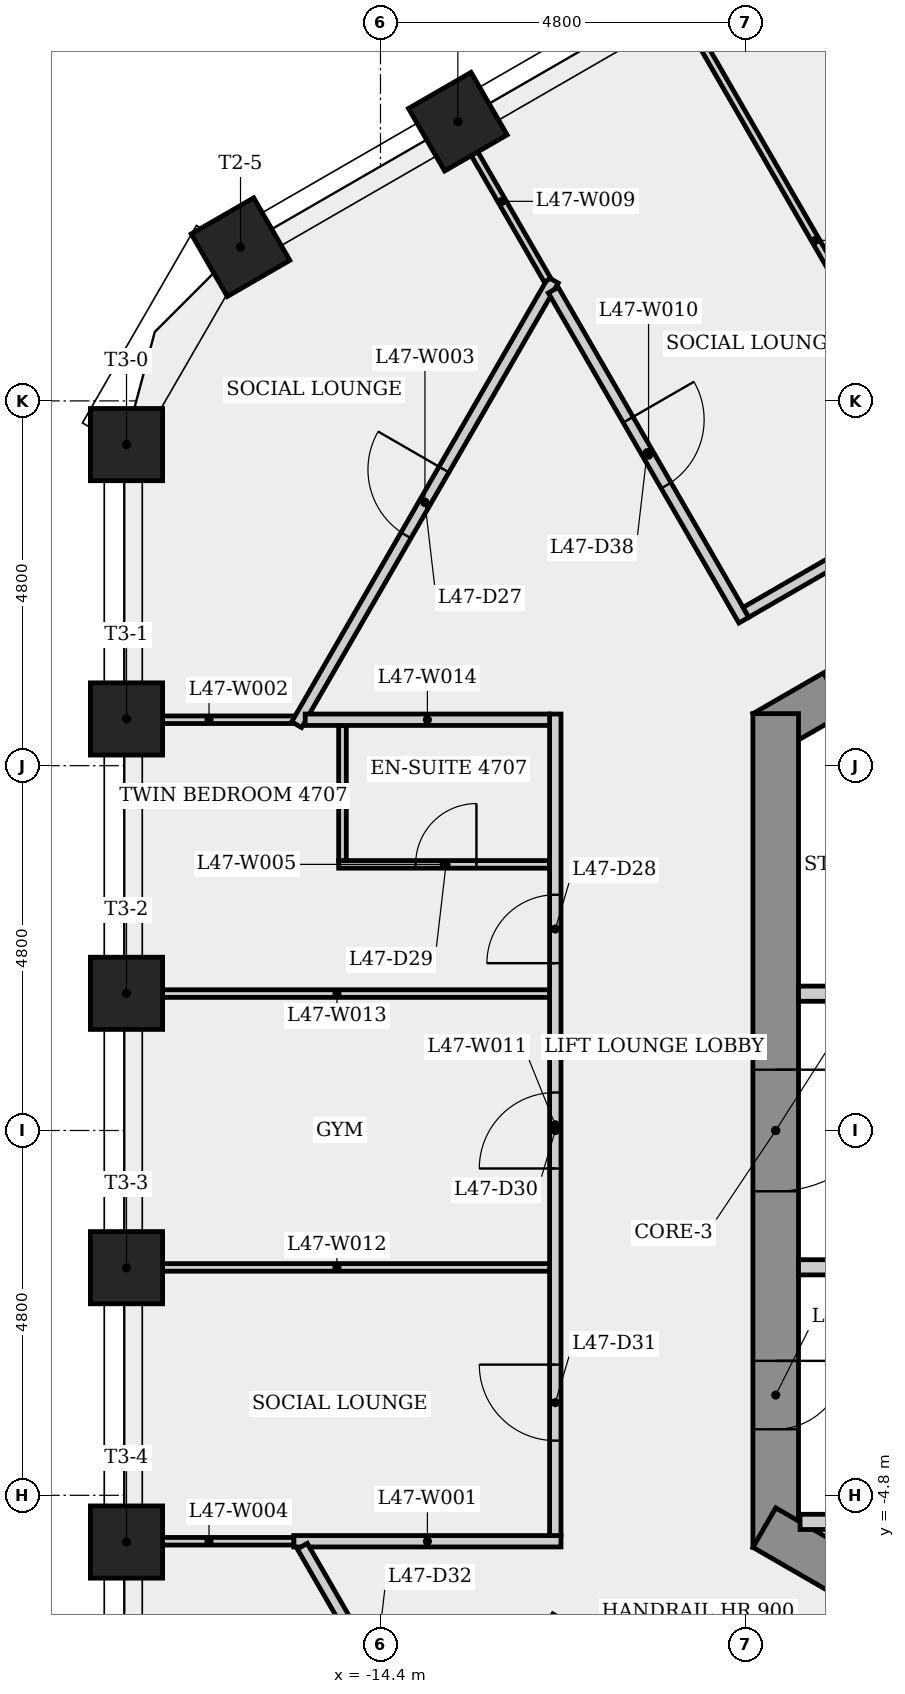
"""IFC4 building model, lengths in metres.
Left out: names, types, materials, properties, quantities, classifications, styles, units other than length and angle.
Written with IfcOpenShell. Run it as: python <this file> out.ifc"""

import sys

from ifc_helpers import new_model, si_unit, direction, frame, frame_2d, origin, origin_2d, place, context, subcontext, project, spatial, rectangle, extrude, element, fill, save


model = new_model("IFC4")
c1 = context("Model", 3, precision=1e-05, world=origin(), true_north=direction((0.0, 1.0)))
c2 = subcontext(c1, "Body", "Model", "MODEL_VIEW")
j1 = project(units=[si_unit("LENGTHUNIT", "METRE"), si_unit("PLANEANGLEUNIT", "RADIAN")], contexts=[c1])
p1 = place(None, origin())
s1 = spatial("IfcSite", under=j1, at=p1, CompositionType="ELEMENT")
p2 = place(p1, origin())
s2 = spatial("IfcBuilding", under=s1, at=p2, CompositionType="ELEMENT")
p3 = place(p2, frame((0.0, 0.0, 176.5)))
s3 = spatial("IfcBuildingStorey", under=s2, at=p3, CompositionType="ELEMENT", Elevation=176.5)
p4 = place(p3, frame((0.15, 10.71, 0.0), z_axis=(0.0, 0.0, 1.0), x_axis=(-0.866023993627, -0.500002442456, 0.0)))
e1 = element("IfcWall", 1, at=p4, inside=s3, PredefinedType="SHEAR", context=c2, shape_type="SweptSolid", body=[
    extrude(rectangle(XDim=10.97, YDim=0.6, at=frame_2d((5.485, 0.0))), origin(), (0.0, 0.0, 1.0), 3.4),
])
p5 = place(p4, frame((9.013, 0.0, 0.0)))
e2 = element("IfcOpeningElement", 2, at=p5, cuts=e1, PredefinedType="OPENING", context=c2, shape_type="SweptSolid", body=[
    extrude(rectangle(XDim=0.9, YDim=2.1, at=frame_2d((0.45, 1.05))), frame((0.0, 0.31, 0.0), z_axis=(0.0, -1.0, 0.0), x_axis=(1.0, 0.0, 0.0)), (0.0, 0.0, 1.0), 0.62),
])
p6 = place(p4, frame((2.437, 0.0, 0.0)))
e3 = element("IfcOpeningElement", 3, at=p6, cuts=e1, PredefinedType="OPENING", context=c2, shape_type="SweptSolid", body=[
    extrude(rectangle(XDim=0.9, YDim=2.1, at=frame_2d((0.45, 1.05))), frame((0.0, 0.31, 0.0), z_axis=(0.0, -1.0, 0.0), x_axis=(1.0, 0.0, 0.0)), (0.0, 0.0, 1.0), 0.62),
])
p7 = place(p3, frame((-9.2, 5.485, 0.0), z_axis=(0.0, 0.0, 1.0), x_axis=(0.0, -1.0, 0.0)))
e4 = element("IfcWall", 4, at=p7, inside=s3, PredefinedType="SHEAR", context=c2, shape_type="SweptSolid", body=[
    extrude(rectangle(XDim=10.97, YDim=0.6, at=frame_2d((5.485, 0.0))), origin(), (0.0, 0.0, 1.0), 3.4),
])
p8 = place(p7, frame((8.516, 0.0, 0.0)))
e5 = element("IfcOpeningElement", 5, at=p8, cuts=e4, PredefinedType="OPENING", context=c2, shape_type="SweptSolid", body=[
    extrude(rectangle(XDim=0.9, YDim=2.1, at=frame_2d((0.45, 1.05))), frame((0.0, 0.31, 0.0), z_axis=(0.0, -1.0, 0.0), x_axis=(1.0, 0.0, 0.0)), (0.0, 0.0, 1.0), 0.62),
])
p9 = place(p7, frame((4.685, 0.0, 0.0)))
e6 = element("IfcOpeningElement", 6, at=p9, cuts=e4, PredefinedType="OPENING", context=c2, shape_type="SweptSolid", body=[
    extrude(rectangle(XDim=1.6, YDim=2.1, at=frame_2d((0.8, 1.05))), frame((0.0, 0.31, 0.0), z_axis=(0.0, -1.0, 0.0), x_axis=(1.0, 0.0, 0.0)), (0.0, 0.0, 1.0), 0.62),
])
p10 = place(p3, frame((-9.35, -5.225, 0.0), z_axis=(0.0, 0.0, 1.0), x_axis=(0.866023993627, -0.500002442456, 0.0)))
e7 = element("IfcWall", 7, at=p10, inside=s3, PredefinedType="SHEAR", context=c2, shape_type="SweptSolid", body=[
    extrude(rectangle(XDim=10.97, YDim=0.6, at=frame_2d((5.485, 0.0))), origin(), (0.0, 0.0, 1.0), 3.4),
])
p11 = place(p10, frame((2.853, 0.0, 0.0)))
e8 = element("IfcOpeningElement", 8, at=p11, cuts=e7, PredefinedType="OPENING", context=c2, shape_type="SweptSolid", body=[
    extrude(rectangle(XDim=0.9, YDim=2.1, at=frame_2d((0.45, 1.05))), frame((0.0, 0.31, 0.0), z_axis=(0.0, -1.0, 0.0), x_axis=(1.0, 0.0, 0.0)), (0.0, 0.0, 1.0), 0.62),
])
for number, where, z_axis, x_axis in (
    (9, (-13.382, 13.274, 0.0), (0.0, 0.0, 1.0), (-0.5, 0.866, 0.0)),
    (10, (-16.241, 11.623, 0.0), (0.0, 0.0, 1.0), (-0.5, 0.866, 0.0)),
    (11, (-17.741, 9.025, 0.0), (0.0, 0.0, 1.0), (-1.0, 0.0, 0.0)),
    (12, (-17.741, 5.415, 0.0), (0.0, 0.0, 1.0), (-1.0, 0.0, 0.0)),
    (13, (-17.741, 1.805, 0.0), (0.0, 0.0, 1.0), (-1.0, 0.0, 0.0)),
    (14, (-17.741, -1.805, 0.0), (0.0, 0.0, 1.0), (-1.0, 0.0, 0.0)),
    (15, (-17.741, -5.415, 0.0), (0.0, 0.0, 1.0), (-1.0, 0.0, 0.0)),
):
    element("IfcColumn", number, at=place(p3, frame(where, z_axis=z_axis, x_axis=x_axis)), inside=s3, PredefinedType="COLUMN", context=c2, shape_type="SweptSolid", body=[
        extrude(rectangle(XDim=0.95, YDim=0.95, at=origin_2d()), origin(), (0.0, 0.0, 1.0), 3.4),
    ])
p12 = place(p3, frame((-15.541, -5.405, 0.0), z_axis=(0.0, 0.0, 1.0), x_axis=(1.0, 0.0, 0.0)))
e16 = element("IfcWall", 16, at=p12, inside=s3, PredefinedType="PARTITIONING", context=c2, shape_type="SweptSolid", body=[
    extrude(rectangle(XDim=3.516, YDim=0.15, at=frame_2d((1.758, 0.0))), origin(), (0.0, 0.0, 1.0), 3.05),
])
p13 = place(p3, frame((-15.541, 5.405, 0.0), z_axis=(0.0, 0.0, 1.0), x_axis=(-1.0, 0.0, 0.0)))
e17 = element("IfcWall", 17, at=p13, inside=s3, PredefinedType="PARTITIONING", context=c2, shape_type="SweptSolid", body=[
    extrude(rectangle(XDim=2.23, YDim=0.1, at=frame_2d((1.115, 0.0))), origin(), (0.0, 0.0, 1.0), 3.05),
])
p14 = place(p3, frame((-15.503, 5.34, 0.0), z_axis=(0.0, 0.0, 1.0), x_axis=(0.499988457423, 0.866032067792, 0.0)))
e18 = element("IfcWall", 18, at=p14, inside=s3, PredefinedType="PARTITIONING", context=c2, shape_type="SweptSolid", body=[
    extrude(rectangle(XDim=6.753, YDim=0.15, at=frame_2d((3.376, 0.0))), origin(), (0.0, 0.0, 1.0), 3.05),
])
p15 = place(p14, frame((2.876, 0.0, 0.0)))
e19 = element("IfcOpeningElement", 19, at=p15, cuts=e18, PredefinedType="OPENING", context=c2, shape_type="SweptSolid", body=[
    extrude(rectangle(XDim=1.0, YDim=2.1, at=frame_2d((0.5, 1.05))), frame((0.0, 0.085, 0.0), z_axis=(0.0, -1.0, 0.0), x_axis=(1.0, 0.0, 0.0)), (0.0, 0.0, 1.0), 0.17),
])
p16 = place(p3, frame((-15.541, -5.405, 0.0), z_axis=(0.0, 0.0, 1.0), x_axis=(-1.0, 0.0, 0.0)))
e20 = element("IfcWall", 20, at=p16, inside=s3, PredefinedType="PARTITIONING", context=c2, shape_type="SweptSolid", body=[
    extrude(rectangle(XDim=2.23, YDim=0.1, at=frame_2d((1.115, 0.0))), origin(), (0.0, 0.0, 1.0), 3.05),
])
p17 = place(p3, frame((-14.95, 3.502, 0.0), z_axis=(0.0, 0.0, 1.0), x_axis=(1.0, 0.0, 0.0)))
e21 = element("IfcWall", 21, at=p17, inside=s3, PredefinedType="PARTITIONING", context=c2, shape_type="SweptSolid", body=[
    extrude(rectangle(XDim=2.775, YDim=0.1, at=frame_2d((1.387, 0.0))), origin(), (0.0, 0.0, 1.0), 3.05),
])
p18 = place(p17, frame((1.012, 0.0, 0.0)))
e22 = element("IfcOpeningElement", 22, at=p18, cuts=e21, PredefinedType="OPENING", context=c2, shape_type="SweptSolid", body=[
    extrude(rectangle(XDim=0.8, YDim=2.1, at=frame_2d((0.4, 1.05))), frame((0.0, 0.06, 0.0), z_axis=(0.0, -1.0, 0.0), x_axis=(1.0, 0.0, 0.0)), (0.0, 0.0, 1.0), 0.12),
])
p19 = place(p3, frame((-14.9, 5.33, 0.0), z_axis=(0.0, 0.0, 1.0), x_axis=(0.0, -1.0, 0.0)))
e23 = element("IfcWall", 23, at=p19, inside=s3, PredefinedType="PARTITIONING", context=c2, shape_type="SweptSolid", body=[
    extrude(rectangle(XDim=1.778, YDim=0.1, at=frame_2d((0.889, 0.0))), origin(), (0.0, 0.0, 1.0), 3.05),
])
p20 = place(p3, frame((-13.512, -8.788, 0.0), z_axis=(0.0, 0.0, 1.0), x_axis=(-0.499983520007, 0.866034918304, 0.0)))
e24 = element("IfcWall", 24, at=p20, inside=s3, PredefinedType="PARTITIONING", context=c2, shape_type="SweptSolid", body=[
    extrude(rectangle(XDim=3.832, YDim=0.15, at=frame_2d((1.916, 0.0))), origin(), (0.0, 0.0, 1.0), 3.05),
])
p21 = place(p20, frame((1.416, 0.0, 0.0)))
e25 = element("IfcOpeningElement", 25, at=p21, cuts=e24, PredefinedType="OPENING", context=c2, shape_type="SweptSolid", body=[
    extrude(rectangle(XDim=1.0, YDim=2.1, at=frame_2d((0.5, 1.05))), frame((0.0, 0.085, 0.0), z_axis=(0.0, -1.0, 0.0), x_axis=(1.0, 0.0, 0.0)), (0.0, 0.0, 1.0), 0.17),
])
p22 = place(p3, frame((-13.4, 13.263, 0.0), z_axis=(0.0, 0.0, 1.0), x_axis=(0.499995825336, -0.866027814014, 0.0)))
e26 = element("IfcWall", 26, at=p22, inside=s3, PredefinedType="PARTITIONING", context=c2, shape_type="SweptSolid", body=[
    extrude(rectangle(XDim=2.396, YDim=0.1, at=frame_2d((1.198, 0.0))), origin(), (0.0, 0.0, 1.0), 3.05),
])
p23 = place(p3, frame((-12.127, 11.058, 0.0), z_axis=(0.0, 0.0, 1.0), x_axis=(0.500018842284, -0.866014524914, 0.0)))
e27 = element("IfcWall", 27, at=p23, inside=s3, PredefinedType="PARTITIONING", context=c2, shape_type="SweptSolid", body=[
    extrude(rectangle(XDim=5.015, YDim=0.15, at=frame_2d((2.507, 0.0))), origin(), (0.0, 0.0, 1.0), 3.05),
])
p24 = place(p23, frame((1.97, 0.0, 0.0)))
e28 = element("IfcOpeningElement", 28, at=p24, cuts=e27, PredefinedType="OPENING", context=c2, shape_type="SweptSolid", body=[
    extrude(rectangle(XDim=1.0, YDim=2.1, at=frame_2d((0.5, 1.05))), frame((0.0, 0.085, 0.0), z_axis=(0.0, -1.0, 0.0), x_axis=(1.0, 0.0, 0.0)), (0.0, 0.0, 1.0), 0.17),
])
p25 = place(p3, frame((-12.1, -5.33, 0.0), z_axis=(0.0, 0.0, 1.0), x_axis=(0.0, 1.0, 0.0)))
e29 = element("IfcWall", 29, at=p25, inside=s3, PredefinedType="PARTITIONING", context=c2, shape_type="SweptSolid", body=[
    extrude(rectangle(XDim=10.809, YDim=0.15, at=frame_2d((5.405, 0.0))), origin(), (0.0, 0.0, 1.0), 3.05),
])
p26 = place(p25, frame((7.531, 0.0, 0.0)))
e30 = element("IfcOpeningElement", 30, at=p26, cuts=e29, PredefinedType="OPENING", context=c2, shape_type="SweptSolid", body=[
    extrude(rectangle(XDim=0.9, YDim=2.1, at=frame_2d((0.45, 1.05))), frame((0.0, 0.085, 0.0), z_axis=(0.0, -1.0, 0.0), x_axis=(1.0, 0.0, 0.0)), (0.0, 0.0, 1.0), 0.17),
])
p27 = place(p25, frame((4.83, 0.0, 0.0)))
e31 = element("IfcOpeningElement", 31, at=p27, cuts=e29, PredefinedType="OPENING", context=c2, shape_type="SweptSolid", body=[
    extrude(rectangle(XDim=1.0, YDim=2.1, at=frame_2d((0.5, 1.05))), frame((0.0, 0.085, 0.0), z_axis=(0.0, -1.0, 0.0), x_axis=(1.0, 0.0, 0.0)), (0.0, 0.0, 1.0), 0.17),
])
p28 = place(p25, frame((1.249, 0.0, 0.0)))
e32 = element("IfcOpeningElement", 32, at=p28, cuts=e29, PredefinedType="OPENING", context=c2, shape_type="SweptSolid", body=[
    extrude(rectangle(XDim=1.0, YDim=2.1, at=frame_2d((0.5, 1.05))), frame((0.0, 0.085, 0.0), z_axis=(0.0, -1.0, 0.0), x_axis=(1.0, 0.0, 0.0)), (0.0, 0.0, 1.0), 0.17),
])
for number, where, z_axis, x_axis in (
    (33, (-12.175, -1.802, 0.0), (0.0, 0.0, 1.0), (-1.0, 0.0, 0.0)),
    (34, (-12.175, 1.802, 0.0), (0.0, 0.0, 1.0), (-1.0, 0.0, 0.0)),
):
    element("IfcWall", number, at=place(p3, frame(where, z_axis=z_axis, x_axis=x_axis)), inside=s3, PredefinedType="PARTITIONING", context=c2, shape_type="SweptSolid", body=[
        extrude(rectangle(XDim=5.596, YDim=0.1, at=frame_2d((2.798, 0.0))), origin(), (0.0, 0.0, 1.0), 3.05),
    ])
p29 = place(p3, frame((-12.175, 5.405, 0.0), z_axis=(0.0, 0.0, 1.0), x_axis=(-1.0, 0.0, 0.0)))
e35 = element("IfcWall", 35, at=p29, inside=s3, PredefinedType="PARTITIONING", context=c2, shape_type="SweptSolid", body=[
    extrude(rectangle(XDim=3.216, YDim=0.15, at=frame_2d((1.608, 0.0))), origin(), (0.0, 0.0, 1.0), 3.05),
])
p30 = place(p3, frame((-9.592, 6.817, 0.0), z_axis=(0.0, 0.0, 1.0), x_axis=(0.866024543535, 0.500001489993, 0.0)))
e36 = element("IfcWall", 36, at=p30, inside=s3, PredefinedType="PARTITIONING", context=c2, shape_type="SweptSolid", body=[
    extrude(rectangle(XDim=9.871, YDim=0.15, at=frame_2d((4.936, 0.0))), origin(), (0.0, 0.0, 1.0), 3.05),
])
p31 = place(p30, frame((6.071, 0.0, 0.0)))
e37 = element("IfcOpeningElement", 37, at=p31, cuts=e36, PredefinedType="OPENING", context=c2, shape_type="SweptSolid", body=[
    extrude(rectangle(XDim=1.0, YDim=2.1, at=frame_2d((0.5, 1.05))), frame((0.0, 0.085, 0.0), z_axis=(0.0, -1.0, 0.0), x_axis=(1.0, 0.0, 0.0)), (0.0, 0.0, 1.0), 0.17),
])
p32 = place(p3, frame((-8.9, 1.8, 0.0), z_axis=(0.0, 0.0, 1.0), x_axis=(1.0, 0.0, 0.0)))
e38 = element("IfcWall", 38, at=p32, inside=s3, PredefinedType="PARTITIONING", context=c2, shape_type="SweptSolid", body=[
    extrude(rectangle(XDim=1.425, YDim=0.2, at=frame_2d((0.712, 0.0))), origin(), (0.0, 0.0, 1.0), 3.05),
])
p33 = place(p3, frame((-8.88, -5.15, 0.0), z_axis=(0.0, 0.0, 1.0), x_axis=(1.0, 0.0, 0.0)))
e39 = element("IfcWall", 39, at=p33, inside=s3, PredefinedType="PARTITIONING", context=c2, shape_type="SweptSolid", body=[
    extrude(rectangle(XDim=11.205, YDim=0.2, at=frame_2d((5.603, 0.0))), origin(), (0.0, 0.0, 1.0), 3.05),
])
p34 = place(p3, frame((-6.823, 8.503, 0.0), z_axis=(0.0, 0.0, 1.0), x_axis=(-0.500011399757, 0.866018822032, 0.0)))
e40 = element("IfcWall", 40, at=p34, inside=s3, PredefinedType="PARTITIONING", context=c2, shape_type="SweptSolid", body=[
    extrude(rectangle(XDim=7.411, YDim=0.1, at=frame_2d((3.706, 0.0))), origin(), (0.0, 0.0, 1.0), 3.05),
])
p35 = place(p3, frame((-8.9, -1.8, 0.0), z_axis=(0.0, 0.0, 1.0), x_axis=(1.0, 0.0, 0.0)))
e41 = element("IfcWall", 41, at=p35, inside=s3, PredefinedType="PARTITIONING", context=c2, shape_type="SweptSolid", body=[
    extrude(rectangle(XDim=11.225, YDim=0.2, at=frame_2d((5.613, 0.0))), origin(), (0.0, 0.0, 1.0), 3.05),
])
p36 = place(p35, frame((2.16, 0.0, 0.0)))
e42 = element("IfcOpeningElement", 42, at=p36, cuts=e41, PredefinedType="OPENING", context=c2, shape_type="SweptSolid", body=[
    extrude(rectangle(XDim=0.9, YDim=2.1, at=frame_2d((0.45, 1.05))), frame((0.0, 0.11, 0.0), z_axis=(0.0, -1.0, 0.0), x_axis=(1.0, 0.0, 0.0)), (0.0, 0.0, 1.0), 0.22),
])
p37 = place(p35, frame((6.61, 0.0, 0.0)))
e43 = element("IfcOpeningElement", 43, at=p37, cuts=e41, PredefinedType="OPENING", context=c2, shape_type="SweptSolid", body=[
    extrude(rectangle(XDim=0.9, YDim=2.1, at=frame_2d((0.45, 1.05))), frame((0.0, 0.11, 0.0), z_axis=(0.0, -1.0, 0.0), x_axis=(1.0, 0.0, 0.0)), (0.0, 0.0, 1.0), 0.22),
])
p38 = place(p35, frame((9.613, 0.0, 0.0)))
e44 = element("IfcOpeningElement", 44, at=p38, cuts=e41, PredefinedType="OPENING", context=c2, shape_type="SweptSolid", body=[
    extrude(rectangle(XDim=0.9, YDim=2.1, at=frame_2d((0.45, 1.05))), frame((0.0, 0.11, 0.0), z_axis=(0.0, -1.0, 0.0), x_axis=(1.0, 0.0, 0.0)), (0.0, 0.0, 1.0), 0.22),
])
p39 = place(p15, origin())
e45 = element("IfcDoor", 45, at=p39, inside=s3, OperationType="SINGLE_SWING_RIGHT", PredefinedType="DOOR", context=c2, shape_type="SweptSolid", body=[
    extrude(rectangle(XDim=1.0, YDim=2.1, at=frame_2d((0.5, 1.05))), frame((0.0, 0.025, 0.0), z_axis=(0.0, -1.0, 0.0), x_axis=(1.0, 0.0, 0.0)), (0.0, 0.0, 1.0), 0.05),
])
fill(e19, e45)
p40 = place(p26, origin())
e46 = element("IfcDoor", 46, at=p40, inside=s3, OperationType="SINGLE_SWING_LEFT", PredefinedType="DOOR", context=c2, shape_type="SweptSolid", body=[
    extrude(rectangle(XDim=0.9, YDim=2.1, at=frame_2d((0.45, 1.05))), frame((0.0, 0.025, 0.0), z_axis=(0.0, -1.0, 0.0), x_axis=(1.0, 0.0, 0.0)), (0.0, 0.0, 1.0), 0.05),
])
fill(e30, e46)
p41 = place(p18, origin())
e47 = element("IfcDoor", 47, at=p41, inside=s3, OperationType="SINGLE_SWING_RIGHT", PredefinedType="DOOR", context=c2, shape_type="SweptSolid", body=[
    extrude(rectangle(XDim=0.8, YDim=2.1, at=frame_2d((0.4, 1.05))), frame((0.0, 0.025, 0.0), z_axis=(0.0, -1.0, 0.0), x_axis=(1.0, 0.0, 0.0)), (0.0, 0.0, 1.0), 0.05),
])
fill(e22, e47)
p42 = place(p27, origin())
e48 = element("IfcDoor", 48, at=p42, inside=s3, OperationType="SINGLE_SWING_LEFT", PredefinedType="DOOR", context=c2, shape_type="SweptSolid", body=[
    extrude(rectangle(XDim=1.0, YDim=2.1, at=frame_2d((0.5, 1.05))), frame((0.0, 0.025, 0.0), z_axis=(0.0, -1.0, 0.0), x_axis=(1.0, 0.0, 0.0)), (0.0, 0.0, 1.0), 0.05),
])
fill(e31, e48)
p43 = place(p28, origin())
e49 = element("IfcDoor", 49, at=p43, inside=s3, OperationType="SINGLE_SWING_RIGHT", PredefinedType="DOOR", context=c2, shape_type="SweptSolid", body=[
    extrude(rectangle(XDim=1.0, YDim=2.1, at=frame_2d((0.5, 1.05))), frame((0.0, 0.025, 0.0), z_axis=(0.0, -1.0, 0.0), x_axis=(1.0, 0.0, 0.0)), (0.0, 0.0, 1.0), 0.05),
])
fill(e32, e49)
p44 = place(p24, origin())
e50 = element("IfcDoor", 50, at=p44, inside=s3, OperationType="SINGLE_SWING_LEFT", PredefinedType="DOOR", context=c2, shape_type="SweptSolid", body=[
    extrude(rectangle(XDim=1.0, YDim=2.1, at=frame_2d((0.5, 1.05))), frame((0.0, 0.025, 0.0), z_axis=(0.0, -1.0, 0.0), x_axis=(1.0, 0.0, 0.0)), (0.0, 0.0, 1.0), 0.05),
])
fill(e28, e50)
p45 = place(p8, origin())
e51 = element("IfcDoor", 51, at=p45, inside=s3, OperationType="SINGLE_SWING_LEFT", PredefinedType="DOOR", context=c2, shape_type="SweptSolid", body=[
    extrude(rectangle(XDim=0.9, YDim=2.1, at=frame_2d((0.45, 1.05))), frame((0.0, 0.025, 0.0), z_axis=(0.0, -1.0, 0.0), x_axis=(1.0, 0.0, 0.0)), (0.0, 0.0, 1.0), 0.05),
])
fill(e5, e51)
p46 = place(p9, origin())
e52 = element("IfcDoor", 52, at=p46, inside=s3, OperationType="SINGLE_SWING_LEFT", PredefinedType="DOOR", context=c2, shape_type="SweptSolid", body=[
    extrude(rectangle(XDim=1.6, YDim=2.1, at=frame_2d((0.8, 1.05))), frame((0.0, 0.025, 0.0), z_axis=(0.0, -1.0, 0.0), x_axis=(1.0, 0.0, 0.0)), (0.0, 0.0, 1.0), 0.05),
])
fill(e6, e52)
save(model, sys.argv[1])
